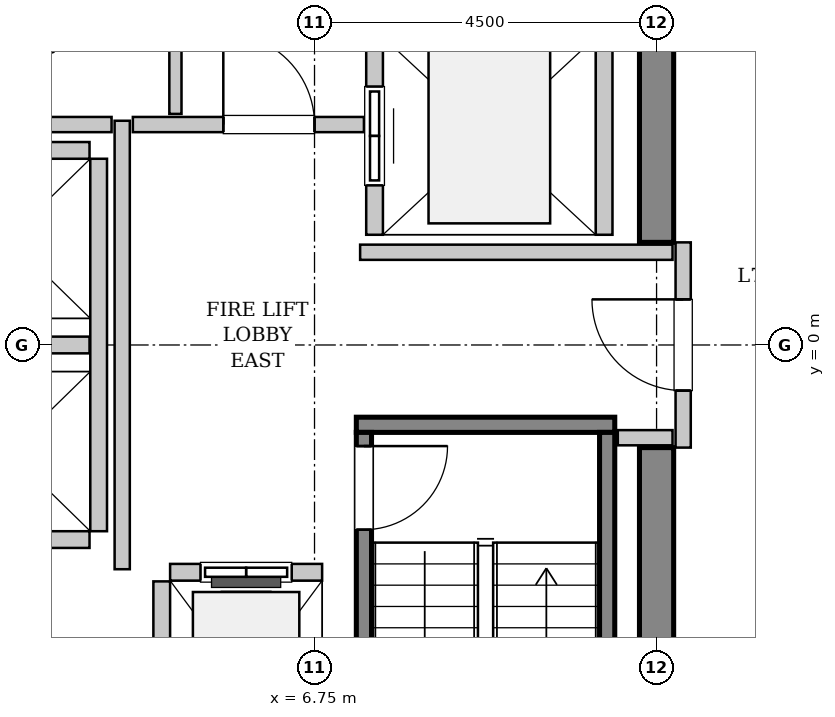
"""IFC4 building model, lengths in metres.
Left out: names, types, materials, properties, quantities, classifications, styles, units other than length and angle.
Written with IfcOpenShell. Run it as: python <this file> out.ifc"""

import sys

from ifc_helpers import new_model, si_unit, direction, frame, frame_2d, origin, place, context, subcontext, project, spatial, rectangle, extrude, source, transform, mapped, element, fill, save


model = new_model("IFC4")
c1 = context("Model", 3, precision=1e-05, world=origin(), true_north=direction((0.0, 1.0)))
c2 = subcontext(c1, "Body", "Model", "MODEL_VIEW")
j1 = project(units=[si_unit("LENGTHUNIT", "METRE"), si_unit("PLANEANGLEUNIT", "RADIAN")], contexts=[c1])
p1 = place(None, origin())
s1 = spatial("IfcSite", under=j1, at=p1, CompositionType="ELEMENT")
p2 = place(p1, origin())
s2 = spatial("IfcBuilding", under=s1, at=p2, CompositionType="ELEMENT")
p3 = place(p2, frame((0.0, 0.0, 295.0)))
s3 = spatial("IfcBuildingStorey", under=s2, at=p3, CompositionType="ELEMENT", Elevation=295.0)
m1 = source(origin(), c2, "Body", "SweptSolid", [
    extrude(rectangle(XDim=7.425, YDim=0.45, at=frame_2d((3.712, 0.0))), origin(), (0.0, 0.0, 1.0), 3.8),
])
for number, where, z_axis, x_axis in (
    (1, (11.25, -8.775, 0.0), (0.0, 0.0, 1.0), (0.0, 1.0, 0.0)),
    (2, (11.25, 1.35, 0.0), (0.0, 0.0, 1.0), (0.0, 1.0, 0.0)),
):
    element("IfcWall", number, at=place(p3, frame(where, z_axis=z_axis, x_axis=x_axis)), inside=s3, PredefinedType="SHEAR", context=c2, shape_type="MappedRepresentation", body=[
        mapped(m1, transform((0.0, 0.0, 0.0), x_axis=(1.0, 0.0, 0.0), y_axis=(0.0, 1.0, 0.0), z_axis=(0.0, 0.0, 1.0), scale=1.0)),
    ])
m2 = source(origin(), c2, "Body", "SweptSolid", [
    extrude(rectangle(XDim=3.4, YDim=0.2, at=frame_2d((1.7, 0.0))), origin(), (0.0, 0.0, 1.0), 3.8),
])
p4 = place(p3, frame((7.3, -1.05, 0.0), z_axis=(0.0, 0.0, 1.0), x_axis=(1.0, 0.0, 0.0)))
e3 = element("IfcWall", 3, at=p4, inside=s3, PredefinedType="SOLIDWALL", context=c2, shape_type="MappedRepresentation", body=[
    mapped(m2, transform((0.0, 0.0, 0.0), x_axis=(1.0, 0.0, 0.0), y_axis=(0.0, 1.0, 0.0), z_axis=(0.0, 0.0, 1.0), scale=1.0)),
])
m3 = source(origin(), c2, "Body", "SweptSolid", [
    extrude(rectangle(XDim=7.1, YDim=0.2, at=frame_2d((3.55, 0.0))), origin(), (0.0, 0.0, 1.0), 3.8),
])
p5 = place(p3, frame((7.4, -1.15, 0.0), z_axis=(0.0, 0.0, 1.0), x_axis=(0.0, -1.0, 0.0)))
e4 = element("IfcWall", 4, at=p5, inside=s3, PredefinedType="SOLIDWALL", context=c2, shape_type="MappedRepresentation", body=[
    mapped(m3, transform((0.0, 0.0, 0.0), x_axis=(1.0, 0.0, 0.0), y_axis=(0.0, 1.0, 0.0), z_axis=(0.0, 0.0, 1.0), scale=1.0)),
])
p6 = place(p5, frame((0.18, 0.0, 0.0)))
e5 = element("IfcOpeningElement", 5, at=p6, cuts=e4, PredefinedType="OPENING", context=c2, shape_type="SweptSolid", body=[
    extrude(rectangle(XDim=1.1, YDim=2.15, at=frame_2d((0.55, 1.075))), frame((0.0, 0.11, 0.0), z_axis=(0.0, -1.0, 0.0), x_axis=(1.0, 0.0, 0.0)), (0.0, 0.0, 1.0), 0.22),
])
p7 = place(p3, frame((10.6, -1.15, 0.0), z_axis=(0.0, 0.0, 1.0), x_axis=(0.0, -1.0, 0.0)))
e6 = element("IfcWall", 6, at=p7, inside=s3, PredefinedType="SOLIDWALL", context=c2, shape_type="MappedRepresentation", body=[
    mapped(m3, transform((0.0, 0.0, 0.0), x_axis=(1.0, 0.0, 0.0), y_axis=(0.0, 1.0, 0.0), z_axis=(0.0, 0.0, 1.0), scale=1.0)),
])
m4 = source(origin(), c2, "Body", "SweptSolid", [
    extrude(rectangle(XDim=2.0, YDim=0.22, at=frame_2d((1.0, 0.0))), origin(), (0.0, 0.0, 1.0), 3.535),
])
p8 = place(p3, frame((6.85, -2.99, 0.0), z_axis=(0.0, 0.0, 1.0), x_axis=(-1.0, 0.0, 0.0)))
e7 = element("IfcWall", 7, at=p8, inside=s3, PredefinedType="SOLIDWALL", context=c2, shape_type="MappedRepresentation", body=[
    mapped(m4, transform((0.0, 0.0, 0.0), x_axis=(1.0, 0.0, 0.0), y_axis=(0.0, 1.0, 0.0), z_axis=(0.0, 0.0, 1.0), scale=1.0)),
])
p9 = place(p8, frame((0.4, 0.0, 0.0)))
e8 = element("IfcOpeningElement", 8, at=p9, cuts=e7, PredefinedType="OPENING", context=c2, shape_type="SweptSolid", body=[
    extrude(rectangle(XDim=1.2, YDim=2.2, at=frame_2d((0.6, 1.1))), frame((0.0, 0.12, 0.0), z_axis=(0.0, -1.0, 0.0), x_axis=(1.0, 0.0, 0.0)), (0.0, 0.0, 1.0), 0.24),
])
m5 = source(origin(), c2, "Body", "SweptSolid", [
    extrude(rectangle(XDim=2.68, YDim=0.22, at=frame_2d((1.34, 0.0))), origin(), (0.0, 0.0, 1.0), 3.535),
])
p10 = place(p3, frame((4.74, -3.11, 0.0), z_axis=(0.0, 0.0, 1.0), x_axis=(0.0, -1.0, 0.0)))
e9 = element("IfcWall", 9, at=p10, inside=s3, PredefinedType="SOLIDWALL", context=c2, shape_type="MappedRepresentation", body=[
    mapped(m5, transform((0.0, 0.0, 0.0), x_axis=(1.0, 0.0, 0.0), y_axis=(0.0, 1.0, 0.0), z_axis=(0.0, 0.0, 1.0), scale=1.0)),
])
m6 = source(origin(), c2, "Body", "SweptSolid", [
    extrude(rectangle(XDim=5.45, YDim=0.22, at=frame_2d((2.725, 0.0))), origin(), (0.0, 0.0, 1.0), 3.535),
])
p11 = place(p3, frame((7.54, 6.9, 0.0), z_axis=(0.0, 0.0, 1.0), x_axis=(0.0, -1.0, 0.0)))
e10 = element("IfcWall", 10, at=p11, inside=s3, PredefinedType="SOLIDWALL", context=c2, shape_type="MappedRepresentation", body=[
    mapped(m6, transform((0.0, 0.0, 0.0), x_axis=(1.0, 0.0, 0.0), y_axis=(0.0, 1.0, 0.0), z_axis=(0.0, 0.0, 1.0), scale=1.0)),
])
p12 = place(p11, frame((3.5, 0.0, 0.0)))
e11 = element("IfcOpeningElement", 11, at=p12, cuts=e10, PredefinedType="OPENING", context=c2, shape_type="SweptSolid", body=[
    extrude(rectangle(XDim=1.3, YDim=2.3, at=frame_2d((0.65, 1.15))), frame((0.0, 0.12, 0.0), z_axis=(0.0, -1.0, 0.0), x_axis=(1.0, 0.0, 0.0)), (0.0, 0.0, 1.0), 0.24),
])
p13 = place(p11, frame((0.65, 0.0, 0.0)))
e12 = element("IfcOpeningElement", 12, at=p13, cuts=e10, PredefinedType="OPENING", context=c2, shape_type="SweptSolid", body=[
    extrude(rectangle(XDim=1.3, YDim=2.3, at=frame_2d((0.65, 1.15))), frame((0.0, 0.12, 0.0), z_axis=(0.0, -1.0, 0.0), x_axis=(1.0, 0.0, 0.0)), (0.0, 0.0, 1.0), 0.24),
])
p14 = place(p3, frame((10.56, 1.45, 0.0), z_axis=(0.0, 0.0, 1.0), x_axis=(0.0, 1.0, 0.0)))
e13 = element("IfcWall", 13, at=p14, inside=s3, PredefinedType="SOLIDWALL", context=c2, shape_type="MappedRepresentation", body=[
    mapped(m6, transform((0.0, 0.0, 0.0), x_axis=(1.0, 0.0, 0.0), y_axis=(0.0, 1.0, 0.0), z_axis=(0.0, 0.0, 1.0), scale=1.0)),
])
m7 = source(origin(), c2, "Body", "SweptSolid", [
    extrude(rectangle(XDim=4.9, YDim=0.22, at=frame_2d((2.45, 0.0))), origin(), (0.0, 0.0, 1.0), 3.535),
])
p15 = place(p3, frame((3.91, -2.45, 0.0), z_axis=(0.0, 0.0, 1.0), x_axis=(0.0, 1.0, 0.0)))
e14 = element("IfcWall", 14, at=p15, inside=s3, PredefinedType="SOLIDWALL", context=c2, shape_type="MappedRepresentation", body=[
    mapped(m7, transform((0.0, 0.0, 0.0), x_axis=(1.0, 0.0, 0.0), y_axis=(0.0, 1.0, 0.0), z_axis=(0.0, 0.0, 1.0), scale=1.0)),
])
m8 = source(origin(), c2, "Body", "SweptSolid", [
    extrude(rectangle(XDim=2.13, YDim=0.22, at=frame_2d((1.065, 0.0))), origin(), (0.0, 0.0, 1.0), 3.535),
])
for number, where, z_axis, x_axis in (
    (15, (1.66, -2.56, 0.0), (0.0, 0.0, 1.0), (1.0, 0.0, 0.0)),
    (16, (1.66, 0.0, 0.0), (0.0, 0.0, 1.0), (1.0, 0.0, 0.0)),
    (17, (3.79, 2.56, 0.0), (0.0, 0.0, 1.0), (-1.0, 0.0, 0.0)),
):
    element("IfcWall", number, at=place(p3, frame(where, z_axis=z_axis, x_axis=x_axis)), inside=s3, PredefinedType="SOLIDWALL", context=c2, shape_type="MappedRepresentation", body=[
        mapped(m8, transform((0.0, 0.0, 0.0), x_axis=(1.0, 0.0, 0.0), y_axis=(0.0, 1.0, 0.0), z_axis=(0.0, 0.0, 1.0), scale=1.0)),
    ])
m9 = source(origin(), c2, "Body", "SweptSolid", [
    extrude(rectangle(XDim=2.7, YDim=0.2, at=frame_2d((1.35, 0.0))), origin(), (0.0, 0.0, 1.0), 2.625),
])
p16 = place(p3, frame((11.6, -1.35, 0.0), z_axis=(0.0, 0.0, 1.0), x_axis=(0.0, 1.0, 0.0)))
e18 = element("IfcWall", 18, at=p16, inside=s3, PredefinedType="PARTITIONING", context=c2, shape_type="MappedRepresentation", body=[
    mapped(m9, transform((0.0, 0.0, 0.0), x_axis=(1.0, 0.0, 0.0), y_axis=(0.0, 1.0, 0.0), z_axis=(0.0, 0.0, 1.0), scale=1.0)),
])
p17 = place(p16, frame((0.75, 0.0, 0.0)))
e19 = element("IfcOpeningElement", 19, at=p17, cuts=e18, PredefinedType="OPENING", context=c2, shape_type="SweptSolid", body=[
    extrude(rectangle(XDim=1.2, YDim=2.15, at=frame_2d((0.6, 1.075))), frame((0.0, 0.11, 0.0), z_axis=(0.0, -1.0, 0.0), x_axis=(1.0, 0.0, 0.0)), (0.0, 0.0, 1.0), 0.22),
])
m10 = source(origin(), c2, "Body", "SweptSolid", [
    extrude(rectangle(XDim=5.9, YDim=0.2, at=frame_2d((2.95, 0.0))), origin(), (0.0, 0.0, 1.0), 3.535),
])
p18 = place(p3, frame((4.22, -2.95, 0.0), z_axis=(0.0, 0.0, 1.0), x_axis=(0.0, 1.0, 0.0)))
e20 = element("IfcWall", 20, at=p18, inside=s3, PredefinedType="PARTITIONING", context=c2, shape_type="MappedRepresentation", body=[
    mapped(m10, transform((0.0, 0.0, 0.0), x_axis=(1.0, 0.0, 0.0), y_axis=(0.0, 1.0, 0.0), z_axis=(0.0, 0.0, 1.0), scale=1.0)),
])
m11 = source(origin(), c2, "Body", "SweptSolid", [
    extrude(rectangle(XDim=2.52, YDim=0.2, at=frame_2d((1.26, 0.0))), origin(), (0.0, 0.0, 1.0), 3.535),
])
p19 = place(p3, frame((1.56, 2.9, 0.0), z_axis=(0.0, 0.0, 1.0), x_axis=(1.0, 0.0, 0.0)))
e21 = element("IfcWall", 21, at=p19, inside=s3, PredefinedType="PARTITIONING", context=c2, shape_type="MappedRepresentation", body=[
    mapped(m11, transform((0.0, 0.0, 0.0), x_axis=(1.0, 0.0, 0.0), y_axis=(0.0, 1.0, 0.0), z_axis=(0.0, 0.0, 1.0), scale=1.0)),
])
m12 = source(origin(), c2, "Body", "SweptSolid", [
    extrude(rectangle(XDim=3.04, YDim=0.2, at=frame_2d((1.52, 0.0))), origin(), (0.0, 0.0, 1.0), 3.535),
])
p20 = place(p3, frame((4.36, 2.9, 0.0), z_axis=(0.0, 0.0, 1.0), x_axis=(1.0, 0.0, 0.0)))
e22 = element("IfcWall", 22, at=p20, inside=s3, PredefinedType="PARTITIONING", context=c2, shape_type="MappedRepresentation", body=[
    mapped(m12, transform((0.0, 0.0, 0.0), x_axis=(1.0, 0.0, 0.0), y_axis=(0.0, 1.0, 0.0), z_axis=(0.0, 0.0, 1.0), scale=1.0)),
])
p21 = place(p20, frame((1.19, 0.0, 0.0)))
e23 = element("IfcOpeningElement", 23, at=p21, cuts=e22, PredefinedType="OPENING", context=c2, shape_type="SweptSolid", body=[
    extrude(rectangle(XDim=1.2, YDim=2.15, at=frame_2d((0.6, 1.075))), frame((0.0, 0.11, 0.0), z_axis=(0.0, -1.0, 0.0), x_axis=(1.0, 0.0, 0.0)), (0.0, 0.0, 1.0), 0.22),
])
m13 = source(origin(), c2, "Body", "SweptSolid", [
    extrude(rectangle(XDim=4.11, YDim=0.2, at=frame_2d((2.055, 0.0))), origin(), (0.0, 0.0, 1.0), 3.535),
])
p22 = place(p3, frame((7.35, 1.22, 0.0), z_axis=(0.0, 0.0, 1.0), x_axis=(1.0, 0.0, 0.0)))
e24 = element("IfcWall", 24, at=p22, inside=s3, PredefinedType="PARTITIONING", context=c2, shape_type="MappedRepresentation", body=[
    mapped(m13, transform((0.0, 0.0, 0.0), x_axis=(1.0, 0.0, 0.0), y_axis=(0.0, 1.0, 0.0), z_axis=(0.0, 0.0, 1.0), scale=1.0)),
])
m14 = source(origin(), c2, "Body", "SweptSolid", [
    extrude(rectangle(XDim=0.72, YDim=0.2, at=frame_2d((0.36, 0.0))), origin(), (0.0, 0.0, 1.0), 3.535),
])
p23 = place(p3, frame((10.74, -1.22, 0.0), z_axis=(0.0, 0.0, 1.0), x_axis=(1.0, 0.0, 0.0)))
e25 = element("IfcWall", 25, at=p23, inside=s3, PredefinedType="PARTITIONING", context=c2, shape_type="MappedRepresentation", body=[
    mapped(m14, transform((0.0, 0.0, 0.0), x_axis=(1.0, 0.0, 0.0), y_axis=(0.0, 1.0, 0.0), z_axis=(0.0, 0.0, 1.0), scale=1.0)),
])
m15 = source(origin(), c2, "Body", "SweptSolid", [
    extrude(rectangle(XDim=5.45, YDim=0.16, at=frame_2d((2.725, 0.0))), origin(), (0.0, 0.0, 1.0), 3.535),
])
p24 = place(p3, frame((4.92, 3.04, 0.0), z_axis=(0.0, 0.0, 1.0), x_axis=(0.0, 1.0, 0.0)))
e26 = element("IfcWall", 26, at=p24, inside=s3, PredefinedType="PARTITIONING", context=c2, shape_type="MappedRepresentation", body=[
    mapped(m15, transform((0.0, 0.0, 0.0), x_axis=(1.0, 0.0, 0.0), y_axis=(0.0, 1.0, 0.0), z_axis=(0.0, 0.0, 1.0), scale=1.0)),
])
m16 = source(origin(), c2, "Body", "SweptSolid", [
    extrude(rectangle(XDim=1.1, YDim=2.15, at=frame_2d((0.55, 1.075))), frame((0.0, 0.025, 0.0), z_axis=(0.0, -1.0, 0.0), x_axis=(1.0, 0.0, 0.0)), (0.0, 0.0, 1.0), 0.05),
])
p25 = place(p6, origin())
e27 = element("IfcDoor", 27, at=p25, inside=s3, OperationType="SINGLE_SWING_LEFT", PredefinedType="DOOR", context=c2, shape_type="MappedRepresentation", body=[
    mapped(m16, transform((0.0, 0.0, 0.0), x_axis=(1.0, 0.0, 0.0), y_axis=(0.0, 1.0, 0.0), z_axis=(0.0, 0.0, 1.0), scale=1.0)),
])
fill(e5, e27)
m17 = source(origin(), c2, "Body", "SweptSolid", [
    extrude(rectangle(XDim=1.2, YDim=2.2, at=frame_2d((0.6, 1.1))), frame((0.0, 0.025, 0.0), z_axis=(0.0, -1.0, 0.0), x_axis=(1.0, 0.0, 0.0)), (0.0, 0.0, 1.0), 0.05),
])
p26 = place(p9, origin())
e28 = element("IfcDoor", 28, at=p26, inside=s3, OperationType="SLIDING_TO_LEFT", PredefinedType="DOOR", context=c2, shape_type="MappedRepresentation", body=[
    mapped(m17, transform((0.0, 0.0, 0.0), x_axis=(1.0, 0.0, 0.0), y_axis=(0.0, 1.0, 0.0), z_axis=(0.0, 0.0, 1.0), scale=1.0)),
])
fill(e8, e28)
m18 = source(origin(), c2, "Body", "SweptSolid", [
    extrude(rectangle(XDim=1.3, YDim=2.3, at=frame_2d((0.65, 1.15))), frame((0.0, 0.025, 0.0), z_axis=(0.0, -1.0, 0.0), x_axis=(1.0, 0.0, 0.0)), (0.0, 0.0, 1.0), 0.05),
])
p27 = place(p12, origin())
e29 = element("IfcDoor", 29, at=p27, inside=s3, OperationType="SLIDING_TO_RIGHT", PredefinedType="DOOR", context=c2, shape_type="MappedRepresentation", body=[
    mapped(m18, transform((0.0, 0.0, 0.0), x_axis=(1.0, 0.0, 0.0), y_axis=(0.0, 1.0, 0.0), z_axis=(0.0, 0.0, 1.0), scale=1.0)),
])
fill(e11, e29)
m19 = source(origin(), c2, "Body", "SweptSolid", [
    extrude(rectangle(XDim=1.2, YDim=2.15, at=frame_2d((0.6, 1.075))), frame((0.0, 0.025, 0.0), z_axis=(0.0, -1.0, 0.0), x_axis=(1.0, 0.0, 0.0)), (0.0, 0.0, 1.0), 0.05),
])
p28 = place(p17, origin())
e30 = element("IfcDoor", 30, at=p28, inside=s3, OperationType="SINGLE_SWING_RIGHT", PredefinedType="DOOR", context=c2, shape_type="MappedRepresentation", body=[
    mapped(m19, transform((0.0, 0.0, 0.0), x_axis=(1.0, 0.0, 0.0), y_axis=(0.0, 1.0, 0.0), z_axis=(0.0, 0.0, 1.0), scale=1.0)),
])
fill(e19, e30)
p29 = place(p21, origin())
e31 = element("IfcDoor", 31, at=p29, inside=s3, OperationType="SINGLE_SWING_LEFT", PredefinedType="DOOR", context=c2, shape_type="MappedRepresentation", body=[
    mapped(m19, transform((0.0, 0.0, 0.0), x_axis=(1.0, 0.0, 0.0), y_axis=(0.0, 1.0, 0.0), z_axis=(0.0, 0.0, 1.0), scale=1.0)),
])
fill(e23, e31)
save(model, sys.argv[1])
